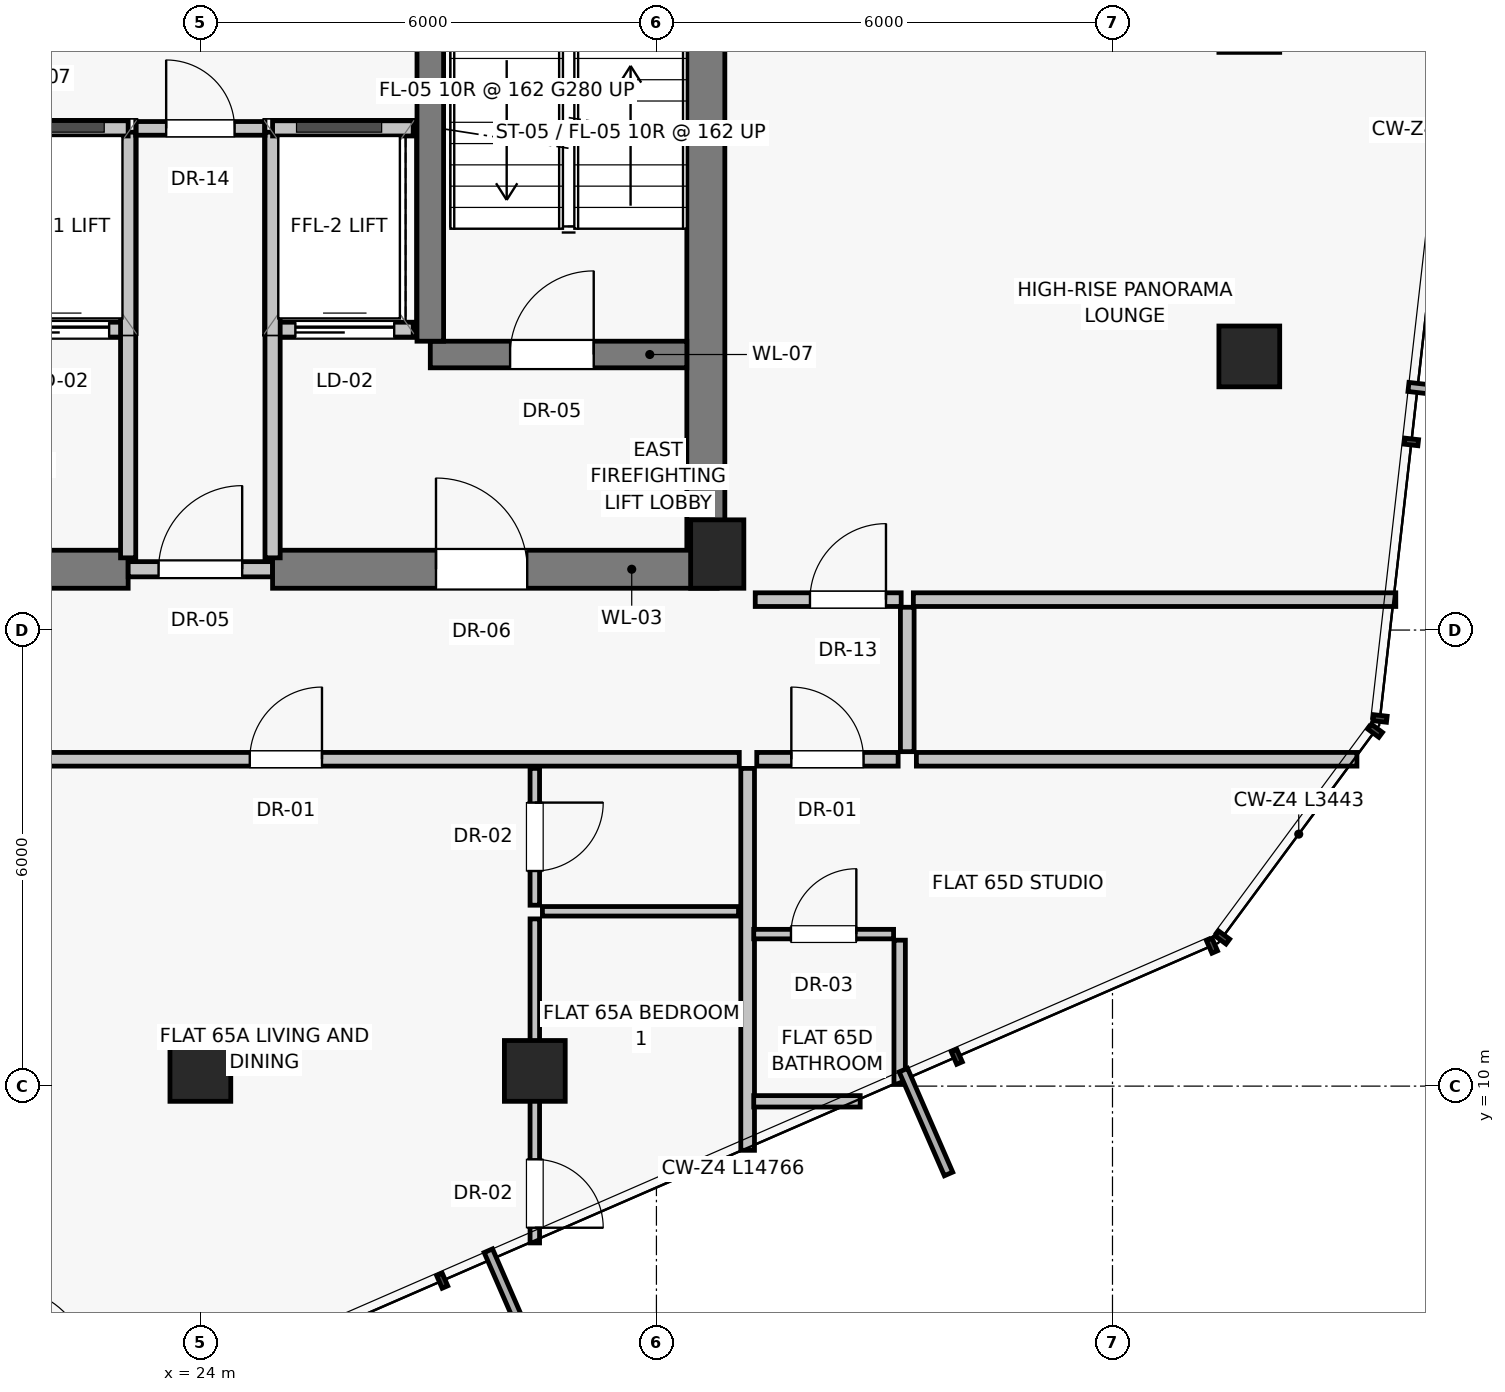
"""IFC4 building model, lengths in metres.
Left out: names, types, materials, properties, quantities, classifications, styles, units other than length and angle.
Written with IfcOpenShell. Run it as: python <this file> out.ifc"""

import sys

from ifc_helpers import new_model, si_unit, direction, frame, frame_2d, origin, origin_2d, place, context, subcontext, project, spatial, rectangle, extrude, source, transform, mapped, element, fill, save


model = new_model("IFC4")
c1 = context("Model", 3, precision=1e-05, world=origin(), true_north=direction((0.0, 1.0)))
c2 = subcontext(c1, "Body", "Model", "MODEL_VIEW")
j1 = project(units=[si_unit("LENGTHUNIT", "METRE"), si_unit("PLANEANGLEUNIT", "RADIAN")], contexts=[c1])
p1 = place(None, origin())
s1 = spatial("IfcSite", under=j1, at=p1, CompositionType="ELEMENT")
p2 = place(p1, origin())
s2 = spatial("IfcBuilding", under=s1, at=p2, CompositionType="ELEMENT")
p3 = place(p2, frame((0.0, 0.0, 230.05)))
s3 = spatial("IfcBuildingStorey", under=s2, at=p3, CompositionType="ELEMENT", Elevation=230.05)
p4 = place(p3, frame((30.8, 17.0, 0.0), z_axis=(0.0, 0.0, 1.0), x_axis=(1.0, 0.0, 0.0)))
e1 = element("IfcColumn", 1, at=p4, inside=s3, PredefinedType="PILASTER", context=c2, shape_type="SweptSolid", body=[
    extrude(rectangle(XDim=0.7, YDim=0.9, at=origin_2d()), origin(), (0.0, 0.0, 1.0), 3.25),
])
for number, where, z_axis, x_axis in (
    (2, (37.8, 19.6, -0.235), (0.0, 0.0, 1.0), (1.0, 0.0, 0.0)),
    (3, (37.8, 24.0, -0.235), (0.0, 0.0, 1.0), (1.0, 0.0, 0.0)),
    (4, (24.0, 10.2, -0.235), (0.0, 0.0, 1.0), (1.0, 0.0, 0.0)),
    (5, (28.4, 10.2, -0.235), (0.0, 0.0, 1.0), (1.0, 0.0, 0.0)),
):
    element("IfcColumn", number, at=place(p3, frame(where, z_axis=z_axis, x_axis=x_axis)), inside=s3, PredefinedType="COLUMN", context=c2, shape_type="SweptSolid", body=[
        extrude(rectangle(XDim=0.8, YDim=0.8, at=origin_2d()), origin(), (0.0, 0.0, 1.0), 3.485),
    ])
p5 = place(p3, frame((30.65, 16.8, 0.0), z_axis=(0.0, 0.0, 1.0), x_axis=(0.0, 1.0, 0.0)))
e6 = element("IfcWall", 6, at=p5, inside=s3, PredefinedType="SHEAR", context=c2, shape_type="SweptSolid", body=[
    extrude(rectangle(XDim=14.2, YDim=0.5, at=frame_2d((7.1, 0.0))), origin(), (0.0, 0.0, 1.0), 3.015),
])
p6 = place(p3, frame((17.2, 16.8, 0.0), z_axis=(0.0, 0.0, 1.0), x_axis=(1.0, 0.0, 0.0)))
e7 = element("IfcWall", 7, at=p6, inside=s3, PredefinedType="SHEAR", context=c2, shape_type="SweptSolid", body=[
    extrude(rectangle(XDim=5.85, YDim=0.5, at=frame_2d((2.925, 0.0))), origin(), (0.0, 0.0, 1.0), 3.015),
])
p7 = place(p6, frame((1.15, 0.0, 0.0)))
e8 = element("IfcOpeningElement", 8, at=p7, cuts=e7, PredefinedType="OPENING", context=c2, shape_type="SweptSolid", body=[
    extrude(rectangle(XDim=1.2, YDim=2.03, at=frame_2d((0.6, 1.015))), frame((0.0, 0.26, 0.0), z_axis=(0.0, -1.0, 0.0), x_axis=(1.0, 0.0, 0.0)), (0.0, 0.0, 1.0), 0.52),
])
p8 = place(p3, frame((23.05, 16.8, 0.0), z_axis=(0.0, 0.0, 1.0), x_axis=(1.0, 0.0, 0.0)))
e9 = element("IfcWall", 9, at=p8, inside=s3, PredefinedType="SOLIDWALL", context=c2, shape_type="SweptSolid", body=[
    extrude(rectangle(XDim=1.9, YDim=0.2, at=frame_2d((0.95, 0.0))), origin(), (0.0, 0.0, 1.0), 2.165),
])
p9 = place(p8, frame((0.4, 0.0, 0.0)))
e10 = element("IfcOpeningElement", 10, at=p9, cuts=e9, PredefinedType="OPENING", context=c2, shape_type="SweptSolid", body=[
    extrude(rectangle(XDim=1.1, YDim=2.03, at=frame_2d((0.55, 1.015))), frame((0.0, 0.11, 0.0), z_axis=(0.0, -1.0, 0.0), x_axis=(1.0, 0.0, 0.0)), (0.0, 0.0, 1.0), 0.22),
])
p10 = place(p3, frame((24.95, 16.8, 0.0), z_axis=(0.0, 0.0, 1.0), x_axis=(1.0, 0.0, 0.0)))
e11 = element("IfcWall", 11, at=p10, inside=s3, PredefinedType="SHEAR", context=c2, shape_type="SweptSolid", body=[
    extrude(rectangle(XDim=5.85, YDim=0.5, at=frame_2d((2.925, 0.0))), origin(), (0.0, 0.0, 1.0), 3.015),
])
p11 = place(p10, frame((2.15, 0.0, 0.0)))
e12 = element("IfcOpeningElement", 12, at=p11, cuts=e11, PredefinedType="OPENING", context=c2, shape_type="SweptSolid", body=[
    extrude(rectangle(XDim=1.2, YDim=2.03, at=frame_2d((0.6, 1.015))), frame((0.0, 0.26, 0.0), z_axis=(0.0, -1.0, 0.0), x_axis=(1.0, 0.0, 0.0)), (0.0, 0.0, 1.0), 0.52),
])
p12 = place(p3, frame((21.2, 19.95, 0.0), z_axis=(0.0, 0.0, 1.0), x_axis=(1.0, 0.0, 0.0)))
e13 = element("IfcWall", 13, at=p12, inside=s3, PredefinedType="SOLIDWALL", context=c2, shape_type="SweptSolid", body=[
    extrude(rectangle(XDim=1.85, YDim=0.2, at=frame_2d((0.925, 0.0))), origin(), (0.0, 0.0, 1.0), 3.015),
])
p13 = place(p12, frame((0.3, 0.0, 0.0)))
e14 = element("IfcOpeningElement", 14, at=p13, cuts=e13, PredefinedType="OPENING", context=c2, shape_type="SweptSolid", body=[
    extrude(rectangle(XDim=1.3, YDim=2.25, at=frame_2d((0.65, 1.125))), frame((0.0, 0.11, 0.0), z_axis=(0.0, -1.0, 0.0), x_axis=(1.0, 0.0, 0.0)), (0.0, 0.0, 1.0), 0.22),
])
p14 = place(p3, frame((24.95, 19.95, 0.0), z_axis=(0.0, 0.0, 1.0), x_axis=(1.0, 0.0, 0.0)))
e15 = element("IfcWall", 15, at=p14, inside=s3, PredefinedType="SOLIDWALL", context=c2, shape_type="SweptSolid", body=[
    extrude(rectangle(XDim=1.85, YDim=0.2, at=frame_2d((0.925, 0.0))), origin(), (0.0, 0.0, 1.0), 3.015),
])
p15 = place(p14, frame((0.3, 0.0, 0.0)))
e16 = element("IfcOpeningElement", 16, at=p15, cuts=e15, PredefinedType="OPENING", context=c2, shape_type="SweptSolid", body=[
    extrude(rectangle(XDim=1.3, YDim=2.25, at=frame_2d((0.65, 1.125))), frame((0.0, 0.11, 0.0), z_axis=(0.0, -1.0, 0.0), x_axis=(1.0, 0.0, 0.0)), (0.0, 0.0, 1.0), 0.22),
])
p16 = place(p3, frame((27.025, 19.625, 0.0), z_axis=(0.0, 0.0, 1.0), x_axis=(1.0, 0.0, 0.0)))
e17 = element("IfcWall", 17, at=p16, inside=s3, PredefinedType="SHEAR", context=c2, shape_type="SweptSolid", body=[
    extrude(rectangle(XDim=3.375, YDim=0.35, at=frame_2d((1.688, 0.0))), origin(), (0.0, 0.0, 1.0), 3.015),
])
p17 = place(p16, frame((1.05, 0.0, 0.0)))
e18 = element("IfcOpeningElement", 18, at=p17, cuts=e17, PredefinedType="OPENING", context=c2, shape_type="SweptSolid", body=[
    extrude(rectangle(XDim=1.1, YDim=2.03, at=frame_2d((0.55, 1.015))), frame((0.0, 0.185, 0.0), z_axis=(0.0, -1.0, 0.0), x_axis=(1.0, 0.0, 0.0)), (0.0, 0.0, 1.0), 0.37),
])
p18 = place(p3, frame((27.025, 19.8, 0.0), z_axis=(0.0, 0.0, 1.0), x_axis=(0.0, 1.0, 0.0)))
e19 = element("IfcWall", 19, at=p18, inside=s3, PredefinedType="SHEAR", context=c2, shape_type="SweptSolid", body=[
    extrude(rectangle(XDim=8.775, YDim=0.35, at=frame_2d((4.387, 0.0))), origin(), (0.0, 0.0, 1.0), 3.015),
])
for number, where, z_axis, x_axis in (
    (20, (23.05, 16.95, 0.0), (0.0, 0.0, 1.0), (0.0, 1.0, 0.0)),
    (21, (24.95, 16.95, 0.0), (0.0, 0.0, 1.0), (0.0, 1.0, 0.0)),
):
    element("IfcWall", number, at=place(p3, frame(where, z_axis=z_axis, x_axis=x_axis)), inside=s3, PredefinedType="SOLIDWALL", context=c2, shape_type="SweptSolid", body=[
        extrude(rectangle(XDim=5.6, YDim=0.2, at=frame_2d((2.8, 0.0))), origin(), (0.0, 0.0, 1.0), 3.015),
    ])
for number, where, z_axis, x_axis in (
    (22, (21.2, 22.6, 0.0), (0.0, 0.0, 1.0), (1.0, 0.0, 0.0)),
    (23, (24.95, 22.6, 0.0), (0.0, 0.0, 1.0), (1.0, 0.0, 0.0)),
):
    element("IfcWall", number, at=place(p3, frame(where, z_axis=z_axis, x_axis=x_axis)), inside=s3, PredefinedType="SOLIDWALL", context=c2, shape_type="SweptSolid", body=[
        extrude(rectangle(XDim=1.85, YDim=0.2, at=frame_2d((0.925, 0.0))), origin(), (0.0, 0.0, 1.0), 3.015),
    ])
p19 = place(p3, frame((23.15, 22.6, 0.0), z_axis=(0.0, 0.0, 1.0), x_axis=(1.0, 0.0, 0.0)))
e24 = element("IfcWall", 24, at=p19, inside=s3, PredefinedType="PARTITIONING", context=c2, shape_type="SweptSolid", body=[
    extrude(rectangle(XDim=1.7, YDim=0.18, at=frame_2d((0.85, 0.0))), origin(), (0.0, 0.0, 1.0), 3.015),
])
p20 = place(p19, frame((0.4, 0.0, 0.0)))
e25 = element("IfcOpeningElement", 25, at=p20, cuts=e24, PredefinedType="OPENING", context=c2, shape_type="SweptSolid", body=[
    extrude(rectangle(XDim=0.9, YDim=2.01, at=frame_2d((0.45, 1.005))), frame((0.0, 0.1, 0.0), z_axis=(0.0, -1.0, 0.0), x_axis=(1.0, 0.0, 0.0)), (0.0, 0.0, 1.0), 0.2),
])
p21 = place(p3, frame((31.2, 14.18, 0.0), z_axis=(0.0, 0.0, 1.0), x_axis=(0.0, -1.0, 0.0)))
e26 = element("IfcWall", 26, at=p21, inside=s3, PredefinedType="PARTITIONING", context=c2, shape_type="SweptSolid", body=[
    extrude(rectangle(XDim=5.024, YDim=0.18, at=frame_2d((2.512, 0.0))), origin(), (0.0, 0.0, 1.0), 3.015),
])
p22 = place(p3, frame((19.71, 14.3, 0.0), z_axis=(0.0, 0.0, 1.0), x_axis=(1.0, 0.0, 0.0)))
e27 = element("IfcWall", 27, at=p22, inside=s3, PredefinedType="PARTITIONING", context=c2, shape_type="SweptSolid", body=[
    extrude(rectangle(XDim=11.38, YDim=0.18, at=frame_2d((5.69, 0.0))), origin(), (0.0, 0.0, 1.0), 3.015),
])
p23 = place(p22, frame((4.94, 0.0, 0.0)))
e28 = element("IfcOpeningElement", 28, at=p23, cuts=e27, PredefinedType="OPENING", context=c2, shape_type="SweptSolid", body=[
    extrude(rectangle(XDim=0.95, YDim=2.02, at=frame_2d((0.475, 1.01))), frame((0.0, 0.1, 0.0), z_axis=(0.0, -1.0, 0.0), x_axis=(1.0, 0.0, 0.0)), (0.0, 0.0, 1.0), 0.2),
])
p24 = place(p3, frame((28.4, 14.18, 0.0), z_axis=(0.0, 0.0, 1.0), x_axis=(0.0, -1.0, 0.0)))
e29 = element("IfcWall", 29, at=p24, inside=s3, PredefinedType="PARTITIONING", context=c2, shape_type="SweptSolid", body=[
    extrude(rectangle(XDim=1.8, YDim=0.125, at=frame_2d((0.9, 0.0))), origin(), (0.0, 0.0, 1.0), 3.015),
])
p25 = place(p24, frame((0.45, 0.0, 0.0)))
e30 = element("IfcOpeningElement", 30, at=p25, cuts=e29, PredefinedType="OPENING", context=c2, shape_type="SweptSolid", body=[
    extrude(rectangle(XDim=0.9, YDim=2.01, at=frame_2d((0.45, 1.005))), frame((0.0, 0.073, 0.0), z_axis=(0.0, -1.0, 0.0), x_axis=(1.0, 0.0, 0.0)), (0.0, 0.0, 1.0), 0.145),
])
p26 = place(p3, frame((28.5, 12.3, 0.0), z_axis=(0.0, 0.0, 1.0), x_axis=(1.0, 0.0, 0.0)))
e31 = element("IfcWall", 31, at=p26, inside=s3, PredefinedType="PARTITIONING", context=c2, shape_type="SweptSolid", body=[
    extrude(rectangle(XDim=2.58, YDim=0.125, at=frame_2d((1.29, 0.0))), origin(), (0.0, 0.0, 1.0), 3.015),
])
p27 = place(p3, frame((28.4, 12.2, 0.0), z_axis=(0.0, 0.0, 1.0), x_axis=(0.0, -1.0, 0.0)))
e32 = element("IfcWall", 32, at=p27, inside=s3, PredefinedType="PARTITIONING", context=c2, shape_type="SweptSolid", body=[
    extrude(rectangle(XDim=4.263, YDim=0.125, at=frame_2d((2.131, 0.0))), origin(), (0.0, 0.0, 1.0), 3.015),
])
p28 = place(p27, frame((3.163, 0.0, 0.0)))
e33 = element("IfcOpeningElement", 33, at=p28, cuts=e32, PredefinedType="OPENING", context=c2, shape_type="SweptSolid", body=[
    extrude(rectangle(XDim=0.9, YDim=2.01, at=frame_2d((0.45, 1.005))), frame((0.0, 0.073, 0.0), z_axis=(0.0, -1.0, 0.0), x_axis=(1.0, 0.0, 0.0)), (0.0, 0.0, 1.0), 0.145),
])
p29 = place(p3, frame((33.3, 14.4, 0.0), z_axis=(0.0, 0.0, 1.0), x_axis=(0.0, 1.0, 0.0)))
e34 = element("IfcWall", 34, at=p29, inside=s3, PredefinedType="PARTITIONING", context=c2, shape_type="SweptSolid", body=[
    extrude(rectangle(XDim=1.9, YDim=0.18, at=frame_2d((0.95, 0.0))), origin(), (0.0, 0.0, 1.0), 3.015),
])
p30 = place(p3, frame((31.3, 16.4, 0.0), z_axis=(0.0, 0.0, 1.0), x_axis=(1.0, 0.0, 0.0)))
e35 = element("IfcWall", 35, at=p30, inside=s3, PredefinedType="PARTITIONING", context=c2, shape_type="SweptSolid", body=[
    extrude(rectangle(XDim=1.92, YDim=0.18, at=frame_2d((0.96, 0.0))), origin(), (0.0, 0.0, 1.0), 3.015),
])
p31 = place(p30, frame((0.72, 0.0, 0.0)))
e36 = element("IfcOpeningElement", 36, at=p31, cuts=e35, PredefinedType="OPENING", context=c2, shape_type="SweptSolid", body=[
    extrude(rectangle(XDim=1.0, YDim=2.01, at=frame_2d((0.5, 1.005))), frame((0.0, 0.1, 0.0), z_axis=(0.0, -1.0, 0.0), x_axis=(1.0, 0.0, 0.0)), (0.0, 0.0, 1.0), 0.2),
])
p32 = place(p3, frame((33.38, 16.4, 0.0), z_axis=(0.0, 0.0, 1.0), x_axis=(1.0, 0.0, 0.0)))
e37 = element("IfcWall", 37, at=p32, inside=s3, PredefinedType="PARTITIONING", context=c2, shape_type="SweptSolid", body=[
    extrude(rectangle(XDim=6.347, YDim=0.18, at=frame_2d((3.174, 0.0))), origin(), (0.0, 0.0, 1.0), 3.015),
])
p33 = place(p3, frame((33.42, 14.3, 0.0), z_axis=(0.0, 0.0, 1.0), x_axis=(1.0, 0.0, 0.0)))
e38 = element("IfcWall", 38, at=p33, inside=s3, PredefinedType="PARTITIONING", context=c2, shape_type="SweptSolid", body=[
    extrude(rectangle(XDim=5.796, YDim=0.18, at=frame_2d((2.898, 0.0))), origin(), (0.0, 0.0, 1.0), 3.015),
])
p34 = place(p3, frame((31.32, 14.3, 0.0), z_axis=(0.0, 0.0, 1.0), x_axis=(1.0, 0.0, 0.0)))
e39 = element("IfcWall", 39, at=p34, inside=s3, PredefinedType="PARTITIONING", context=c2, shape_type="SweptSolid", body=[
    extrude(rectangle(XDim=1.86, YDim=0.18, at=frame_2d((0.93, 0.0))), origin(), (0.0, 0.0, 1.0), 3.015),
])
p35 = place(p34, frame((0.455, 0.0, 0.0)))
e40 = element("IfcOpeningElement", 40, at=p35, cuts=e39, PredefinedType="OPENING", context=c2, shape_type="SweptSolid", body=[
    extrude(rectangle(XDim=0.95, YDim=2.02, at=frame_2d((0.475, 1.01))), frame((0.0, 0.1, 0.0), z_axis=(0.0, -1.0, 0.0), x_axis=(1.0, 0.0, 0.0)), (0.0, 0.0, 1.0), 0.2),
])
p36 = place(p3, frame((31.28, 12.0, 0.0), z_axis=(0.0, 0.0, 1.0), x_axis=(1.0, 0.0, 0.0)))
e41 = element("IfcWall", 41, at=p36, inside=s3, PredefinedType="PARTITIONING", context=c2, shape_type="SweptSolid", body=[
    extrude(rectangle(XDim=1.84, YDim=0.125, at=frame_2d((0.92, 0.0))), origin(), (0.0, 0.0, 1.0), 3.015),
])
p37 = place(p36, frame((0.49, 0.0, 0.0)))
e42 = element("IfcOpeningElement", 42, at=p37, cuts=e41, PredefinedType="OPENING", context=c2, shape_type="SweptSolid", body=[
    extrude(rectangle(XDim=0.86, YDim=2.01, at=frame_2d((0.43, 1.005))), frame((0.0, 0.073, 0.0), z_axis=(0.0, -1.0, 0.0), x_axis=(1.0, 0.0, 0.0)), (0.0, 0.0, 1.0), 0.145),
])
p38 = place(p3, frame((31.28, 9.8, 0.0), z_axis=(0.0, 0.0, 1.0), x_axis=(1.0, 0.0, 0.0)))
e43 = element("IfcWall", 43, at=p38, inside=s3, PredefinedType="PARTITIONING", context=c2, shape_type="SweptSolid", body=[
    extrude(rectangle(XDim=1.401, YDim=0.15, at=frame_2d((0.7, 0.0))), origin(), (0.0, 0.0, 1.0), 3.015),
])
p39 = place(p3, frame((33.2, 10.026, 0.0), z_axis=(0.0, 0.0, 1.0), x_axis=(0.0, 1.0, 0.0)))
e44 = element("IfcWall", 44, at=p39, inside=s3, PredefinedType="PARTITIONING", context=c2, shape_type="SweptSolid", body=[
    extrude(rectangle(XDim=1.894, YDim=0.15, at=frame_2d((0.947, 0.0))), origin(), (0.0, 0.0, 1.0), 3.015),
])
m1 = source(origin(), c2, "Body", "SweptSolid", [
    extrude(rectangle(XDim=1.1, YDim=2.03, at=frame_2d((0.55, 1.015))), frame((0.0, 0.025, 0.0), z_axis=(0.0, -1.0, 0.0), x_axis=(1.0, 0.0, 0.0)), (0.0, 0.0, 1.0), 0.05),
])
p40 = place(p9, origin())
e45 = element("IfcDoor", 45, at=p40, inside=s3, OperationType="SINGLE_SWING_RIGHT", PredefinedType="DOOR", context=c2, shape_type="MappedRepresentation", body=[
    mapped(m1, transform((0.0, 0.0, 0.0), scale=1.0)),
])
fill(e10, e45)
m2 = source(origin(), c2, "Body", "SweptSolid", [
    extrude(rectangle(XDim=1.2, YDim=2.03, at=frame_2d((0.6, 1.015))), frame((0.0, 0.025, 0.0), z_axis=(0.0, -1.0, 0.0), x_axis=(1.0, 0.0, 0.0)), (0.0, 0.0, 1.0), 0.05),
])
p41 = place(p11, origin())
e46 = element("IfcDoor", 46, at=p41, inside=s3, OperationType="SINGLE_SWING_LEFT", PredefinedType="DOOR", context=c2, shape_type="MappedRepresentation", body=[
    mapped(m2, transform((0.0, 0.0, 0.0), scale=1.0)),
])
fill(e12, e46)
m3 = source(origin(), c2, "Body", "SweptSolid", [
    extrude(rectangle(XDim=1.3, YDim=2.25, at=frame_2d((0.65, 1.125))), frame((0.0, 0.025, 0.0), z_axis=(0.0, -1.0, 0.0), x_axis=(1.0, 0.0, 0.0)), (0.0, 0.0, 1.0), 0.05),
])
p42 = place(p13, origin())
e47 = element("IfcDoor", 47, at=p42, inside=s3, OperationType="SLIDING_TO_LEFT", PredefinedType="DOOR", context=c2, shape_type="MappedRepresentation", body=[
    mapped(m3, transform((0.0, 0.0, 0.0), scale=1.0)),
])
fill(e14, e47)
p43 = place(p15, origin())
e48 = element("IfcDoor", 48, at=p43, inside=s3, OperationType="SLIDING_TO_LEFT", PredefinedType="DOOR", context=c2, shape_type="MappedRepresentation", body=[
    mapped(m3, transform((0.0, 0.0, 0.0), scale=1.0)),
])
fill(e16, e48)
p44 = place(p17, origin())
e49 = element("IfcDoor", 49, at=p44, inside=s3, OperationType="SINGLE_SWING_RIGHT", PredefinedType="DOOR", context=c2, shape_type="MappedRepresentation", body=[
    mapped(m1, transform((0.0, 0.0, 0.0), scale=1.0)),
])
fill(e18, e49)
m4 = source(origin(), c2, "Body", "SweptSolid", [
    extrude(rectangle(XDim=0.9, YDim=2.01, at=frame_2d((0.45, 1.005))), frame((0.0, 0.025, 0.0), z_axis=(0.0, -1.0, 0.0), x_axis=(1.0, 0.0, 0.0)), (0.0, 0.0, 1.0), 0.05),
])
p45 = place(p20, origin())
e50 = element("IfcDoor", 50, at=p45, inside=s3, OperationType="SINGLE_SWING_LEFT", PredefinedType="DOOR", context=c2, shape_type="MappedRepresentation", body=[
    mapped(m4, transform((0.0, 0.0, 0.0), scale=1.0)),
])
fill(e25, e50)
m5 = source(origin(), c2, "Body", "SweptSolid", [
    extrude(rectangle(XDim=0.95, YDim=2.02, at=frame_2d((0.475, 1.01))), frame((0.0, 0.025, 0.0), z_axis=(0.0, -1.0, 0.0), x_axis=(1.0, 0.0, 0.0)), (0.0, 0.0, 1.0), 0.05),
])
p46 = place(p23, origin())
e51 = element("IfcDoor", 51, at=p46, inside=s3, OperationType="SINGLE_SWING_RIGHT", PredefinedType="DOOR", context=c2, shape_type="MappedRepresentation", body=[
    mapped(m5, transform((0.0, 0.0, 0.0), scale=1.0)),
])
fill(e28, e51)
p47 = place(p25, origin())
e52 = element("IfcDoor", 52, at=p47, inside=s3, OperationType="SINGLE_SWING_LEFT", PredefinedType="DOOR", context=c2, shape_type="MappedRepresentation", body=[
    mapped(m4, transform((0.0, 0.0, 0.0), scale=1.0)),
])
fill(e30, e52)
p48 = place(p28, origin())
e53 = element("IfcDoor", 53, at=p48, inside=s3, OperationType="SINGLE_SWING_RIGHT", PredefinedType="DOOR", context=c2, shape_type="MappedRepresentation", body=[
    mapped(m4, transform((0.0, 0.0, 0.0), scale=1.0)),
])
fill(e33, e53)
m6 = source(origin(), c2, "Body", "SweptSolid", [
    extrude(rectangle(XDim=1.0, YDim=2.01, at=frame_2d((0.5, 1.005))), frame((0.0, 0.025, 0.0), z_axis=(0.0, -1.0, 0.0), x_axis=(1.0, 0.0, 0.0)), (0.0, 0.0, 1.0), 0.05),
])
p49 = place(p31, origin())
e54 = element("IfcDoor", 54, at=p49, inside=s3, OperationType="SINGLE_SWING_RIGHT", PredefinedType="DOOR", context=c2, shape_type="MappedRepresentation", body=[
    mapped(m6, transform((0.0, 0.0, 0.0), scale=1.0)),
])
fill(e36, e54)
p50 = place(p35, origin())
e55 = element("IfcDoor", 55, at=p50, inside=s3, OperationType="SINGLE_SWING_LEFT", PredefinedType="DOOR", context=c2, shape_type="MappedRepresentation", body=[
    mapped(m5, transform((0.0, 0.0, 0.0), scale=1.0)),
])
fill(e40, e55)
m7 = source(origin(), c2, "Body", "SweptSolid", [
    extrude(rectangle(XDim=0.86, YDim=2.01, at=frame_2d((0.43, 1.005))), frame((0.0, 0.025, 0.0), z_axis=(0.0, -1.0, 0.0), x_axis=(1.0, 0.0, 0.0)), (0.0, 0.0, 1.0), 0.05),
])
p51 = place(p37, origin())
e56 = element("IfcDoor", 56, at=p51, inside=s3, OperationType="SINGLE_SWING_RIGHT", PredefinedType="DOOR", context=c2, shape_type="MappedRepresentation", body=[
    mapped(m7, transform((0.0, 0.0, 0.0), scale=1.0)),
])
fill(e42, e56)
save(model, sys.argv[1])
